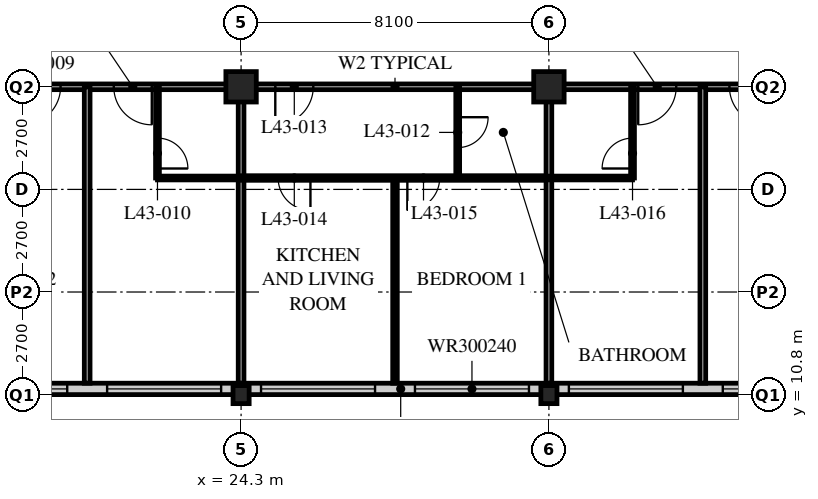
"""IFC4 building model, lengths in metres.
Left out: names, types, materials, properties, quantities, classifications, styles, units other than length and angle.
Written with IfcOpenShell. Run it as: python <this file> out.ifc"""

import sys

from ifc_helpers import new_model, si_unit, direction, frame, frame_2d, origin, origin_2d, place, context, subcontext, project, spatial, rectangle, hollow_rectangle, i_section, extrude, element, fill, save


model = new_model("IFC4")
c1 = context("Model", 3, precision=1e-05, world=origin(), true_north=direction((0.0, 1.0)))
c2 = subcontext(c1, "Body", "Model", "MODEL_VIEW")
j1 = project(units=[si_unit("LENGTHUNIT", "METRE"), si_unit("PLANEANGLEUNIT", "RADIAN")], contexts=[c1])
p1 = place(None, origin())
s1 = spatial("IfcSite", under=j1, at=p1, CompositionType="ELEMENT")
p2 = place(p1, origin())
s2 = spatial("IfcBuilding", under=s1, at=p2, CompositionType="ELEMENT")
p3 = place(p2, frame((0.0, 0.0, 170.4)))
s3 = spatial("IfcBuildingStorey", under=s2, at=p3, CompositionType="ELEMENT", Elevation=170.4)
p4 = place(p3, frame((24.3, 10.8, 0.0), z_axis=(0.0, 0.0, 1.0), x_axis=(1.0, 0.0, 0.0)))
e1 = element("IfcColumn", 1, at=p4, inside=s3, PredefinedType="COLUMN", context=c2, shape_type="SweptSolid", body=[
    extrude(i_section(OverallWidth=0.424, OverallDepth=0.475, WebThickness=0.048, FlangeThickness=0.077, FilletRadius=0.015, at=origin_2d()), origin(), (0.0, 0.0, 1.0), 3.6),
])
p5 = place(p3, frame((24.3, 18.9, 0.0), z_axis=(0.0, 0.0, 1.0), x_axis=(1.0, 0.0, 0.0)))
e2 = element("IfcColumn", 2, at=p5, inside=s3, PredefinedType="COLUMN", context=c2, shape_type="SweptSolid", body=[
    extrude(hollow_rectangle(XDim=0.8, YDim=0.8, WallThickness=0.08, at=origin_2d()), origin(), (0.0, 0.0, 1.0), 3.6),
])
p6 = place(p3, frame((32.4, 10.8, 0.0), z_axis=(0.0, 0.0, 1.0), x_axis=(1.0, 0.0, 0.0)))
e3 = element("IfcColumn", 3, at=p6, inside=s3, PredefinedType="COLUMN", context=c2, shape_type="SweptSolid", body=[
    extrude(i_section(OverallWidth=0.424, OverallDepth=0.475, WebThickness=0.048, FlangeThickness=0.077, FilletRadius=0.015, at=origin_2d()), origin(), (0.0, 0.0, 1.0), 3.6),
])
p7 = place(p3, frame((32.4, 18.9, 0.0), z_axis=(0.0, 0.0, 1.0), x_axis=(1.0, 0.0, 0.0)))
e4 = element("IfcColumn", 4, at=p7, inside=s3, PredefinedType="COLUMN", context=c2, shape_type="SweptSolid", body=[
    extrude(hollow_rectangle(XDim=0.8, YDim=0.8, WallThickness=0.08, at=origin_2d()), origin(), (0.0, 0.0, 1.0), 3.6),
])
p8 = place(p3, frame((8.4, 10.95, 0.0), z_axis=(0.0, 0.0, 1.0), x_axis=(1.0, 0.0, 0.0)))
e5 = element("IfcWall", 5, at=p8, inside=s3, PredefinedType="SOLIDWALL", context=c2, shape_type="SweptSolid", body=[
    extrude(rectangle(XDim=40.2, YDim=0.3, at=frame_2d((20.1, 0.0))), origin(), (0.0, 0.0, 1.0), 3.39),
])
p9 = place(p8, frame((0.225, 0.0, 0.6)))
e6 = element("IfcOpeningElement", 6, at=p9, cuts=e5, PredefinedType="OPENING", context=c2, shape_type="SweptSolid", body=[
    extrude(rectangle(XDim=3.0, YDim=2.4, at=frame_2d((1.5, 1.2))), frame((0.0, 0.16, 0.0), z_axis=(0.0, -1.0, 0.0), x_axis=(1.0, 0.0, 0.0)), (0.0, 0.0, 1.0), 0.32),
])
p10 = place(p8, frame((4.275, 0.0, 0.6)))
e7 = element("IfcOpeningElement", 7, at=p10, cuts=e5, PredefinedType="OPENING", context=c2, shape_type="SweptSolid", body=[
    extrude(rectangle(XDim=3.0, YDim=2.4, at=frame_2d((1.5, 1.2))), frame((0.0, 0.16, 0.0), z_axis=(0.0, -1.0, 0.0), x_axis=(1.0, 0.0, 0.0)), (0.0, 0.0, 1.0), 0.32),
])
p11 = place(p8, frame((8.325, 0.0, 0.6)))
e8 = element("IfcOpeningElement", 8, at=p11, cuts=e5, PredefinedType="OPENING", context=c2, shape_type="SweptSolid", body=[
    extrude(rectangle(XDim=3.0, YDim=2.4, at=frame_2d((1.5, 1.2))), frame((0.0, 0.16, 0.0), z_axis=(0.0, -1.0, 0.0), x_axis=(1.0, 0.0, 0.0)), (0.0, 0.0, 1.0), 0.32),
])
p12 = place(p8, frame((12.375, 0.0, 0.6)))
e9 = element("IfcOpeningElement", 9, at=p12, cuts=e5, PredefinedType="OPENING", context=c2, shape_type="SweptSolid", body=[
    extrude(rectangle(XDim=3.0, YDim=2.4, at=frame_2d((1.5, 1.2))), frame((0.0, 0.16, 0.0), z_axis=(0.0, -1.0, 0.0), x_axis=(1.0, 0.0, 0.0)), (0.0, 0.0, 1.0), 0.32),
])
p13 = place(p8, frame((16.425, 0.0, 0.6)))
e10 = element("IfcOpeningElement", 10, at=p13, cuts=e5, PredefinedType="OPENING", context=c2, shape_type="SweptSolid", body=[
    extrude(rectangle(XDim=3.0, YDim=2.4, at=frame_2d((1.5, 1.2))), frame((0.0, 0.16, 0.0), z_axis=(0.0, -1.0, 0.0), x_axis=(1.0, 0.0, 0.0)), (0.0, 0.0, 1.0), 0.32),
])
p14 = place(p8, frame((20.475, 0.0, 0.6)))
e11 = element("IfcOpeningElement", 11, at=p14, cuts=e5, PredefinedType="OPENING", context=c2, shape_type="SweptSolid", body=[
    extrude(rectangle(XDim=3.0, YDim=2.4, at=frame_2d((1.5, 1.2))), frame((0.0, 0.16, 0.0), z_axis=(0.0, -1.0, 0.0), x_axis=(1.0, 0.0, 0.0)), (0.0, 0.0, 1.0), 0.32),
])
p15 = place(p8, frame((24.525, 0.0, 0.6)))
e12 = element("IfcOpeningElement", 12, at=p15, cuts=e5, PredefinedType="OPENING", context=c2, shape_type="SweptSolid", body=[
    extrude(rectangle(XDim=3.0, YDim=2.4, at=frame_2d((1.5, 1.2))), frame((0.0, 0.16, 0.0), z_axis=(0.0, -1.0, 0.0), x_axis=(1.0, 0.0, 0.0)), (0.0, 0.0, 1.0), 0.32),
])
p16 = place(p8, frame((28.575, 0.0, 0.6)))
e13 = element("IfcOpeningElement", 13, at=p16, cuts=e5, PredefinedType="OPENING", context=c2, shape_type="SweptSolid", body=[
    extrude(rectangle(XDim=3.0, YDim=2.4, at=frame_2d((1.5, 1.2))), frame((0.0, 0.16, 0.0), z_axis=(0.0, -1.0, 0.0), x_axis=(1.0, 0.0, 0.0)), (0.0, 0.0, 1.0), 0.32),
])
p17 = place(p8, frame((32.625, 0.0, 0.6)))
e14 = element("IfcOpeningElement", 14, at=p17, cuts=e5, PredefinedType="OPENING", context=c2, shape_type="SweptSolid", body=[
    extrude(rectangle(XDim=3.0, YDim=2.4, at=frame_2d((1.5, 1.2))), frame((0.0, 0.16, 0.0), z_axis=(0.0, -1.0, 0.0), x_axis=(1.0, 0.0, 0.0)), (0.0, 0.0, 1.0), 0.32),
])
p18 = place(p8, frame((36.675, 0.0, 0.6)))
e15 = element("IfcOpeningElement", 15, at=p18, cuts=e5, PredefinedType="OPENING", context=c2, shape_type="SweptSolid", body=[
    extrude(rectangle(XDim=3.0, YDim=2.4, at=frame_2d((1.5, 1.2))), frame((0.0, 0.16, 0.0), z_axis=(0.0, -1.0, 0.0), x_axis=(1.0, 0.0, 0.0)), (0.0, 0.0, 1.0), 0.32),
])
p19 = place(p3, frame((12.15, 18.9, 0.0), z_axis=(0.0, 0.0, 1.0), x_axis=(1.0, 0.0, 0.0)))
e16 = element("IfcWall", 16, at=p19, inside=s3, PredefinedType="PARTITIONING", context=c2, shape_type="SweptSolid", body=[
    extrude(rectangle(XDim=32.4, YDim=0.15, at=frame_2d((16.2, 0.0))), origin(), (0.0, 0.0, 1.0), 2.778),
])
p20 = place(p19, frame((6.4, 0.0, 0.0)))
e17 = element("IfcOpeningElement", 17, at=p20, cuts=e16, PredefinedType="OPENING", context=c2, shape_type="SweptSolid", body=[
    extrude(rectangle(XDim=1.0, YDim=2.1, at=frame_2d((0.5, 1.05))), frame((0.0, 0.085, 0.0), z_axis=(0.0, -1.0, 0.0), x_axis=(1.0, 0.0, 0.0)), (0.0, 0.0, 1.0), 0.17),
])
p21 = place(p19, frame((8.8, 0.0, 0.0)))
e18 = element("IfcOpeningElement", 18, at=p21, cuts=e16, PredefinedType="OPENING", context=c2, shape_type="SweptSolid", body=[
    extrude(rectangle(XDim=1.0, YDim=2.1, at=frame_2d((0.5, 1.05))), frame((0.0, 0.085, 0.0), z_axis=(0.0, -1.0, 0.0), x_axis=(1.0, 0.0, 0.0)), (0.0, 0.0, 1.0), 0.17),
])
p22 = place(p19, frame((13.05, 0.0, 0.0)))
e19 = element("IfcOpeningElement", 19, at=p22, cuts=e16, PredefinedType="OPENING", context=c2, shape_type="SweptSolid", body=[
    extrude(rectangle(XDim=1.0, YDim=2.1, at=frame_2d((0.5, 1.05))), frame((0.0, 0.085, 0.0), z_axis=(0.0, -1.0, 0.0), x_axis=(1.0, 0.0, 0.0)), (0.0, 0.0, 1.0), 0.17),
])
p23 = place(p19, frame((22.6, 0.0, 0.0)))
e20 = element("IfcOpeningElement", 20, at=p23, cuts=e16, PredefinedType="OPENING", context=c2, shape_type="SweptSolid", body=[
    extrude(rectangle(XDim=1.0, YDim=2.1, at=frame_2d((0.5, 1.05))), frame((0.0, 0.085, 0.0), z_axis=(0.0, -1.0, 0.0), x_axis=(1.0, 0.0, 0.0)), (0.0, 0.0, 1.0), 0.17),
])
p24 = place(p19, frame((25.0, 0.0, 0.0)))
e21 = element("IfcOpeningElement", 21, at=p24, cuts=e16, PredefinedType="OPENING", context=c2, shape_type="SweptSolid", body=[
    extrude(rectangle(XDim=1.0, YDim=2.1, at=frame_2d((0.5, 1.05))), frame((0.0, 0.085, 0.0), z_axis=(0.0, -1.0, 0.0), x_axis=(1.0, 0.0, 0.0)), (0.0, 0.0, 1.0), 0.17),
])
p25 = place(p19, frame((1.525, 0.0, 0.0)))
e22 = element("IfcOpeningElement", 22, at=p25, cuts=e16, PredefinedType="OPENING", context=c2, shape_type="SweptSolid", body=[
    extrude(rectangle(XDim=1.0, YDim=2.1, at=frame_2d((0.5, 1.05))), frame((0.0, 0.085, 0.0), z_axis=(0.0, -1.0, 0.0), x_axis=(1.0, 0.0, 0.0)), (0.0, 0.0, 1.0), 0.17),
])
p26 = place(p19, frame((29.875, 0.0, 0.0)))
e23 = element("IfcOpeningElement", 23, at=p26, cuts=e16, PredefinedType="OPENING", context=c2, shape_type="SweptSolid", body=[
    extrude(rectangle(XDim=1.0, YDim=2.1, at=frame_2d((0.5, 1.05))), frame((0.0, 0.085, 0.0), z_axis=(0.0, -1.0, 0.0), x_axis=(1.0, 0.0, 0.0)), (0.0, 0.0, 1.0), 0.17),
])
p27 = place(p3, frame((20.25, 18.9, 0.0), z_axis=(0.0, 0.0, 1.0), x_axis=(0.0, -1.0, 0.0)))
e24 = element("IfcWall", 24, at=p27, inside=s3, PredefinedType="PARTITIONING", context=c2, shape_type="SweptSolid", body=[
    extrude(rectangle(XDim=7.8, YDim=0.15, at=frame_2d((3.9, 0.0))), origin(), (0.0, 0.0, 1.0), 3.39),
])
p28 = place(p3, frame((22.1, 16.5, 0.0), z_axis=(0.0, 0.0, 1.0), x_axis=(1.0, 0.0, 0.0)))
e25 = element("IfcWall", 25, at=p28, inside=s3, PredefinedType="PARTITIONING", context=c2, shape_type="SweptSolid", body=[
    extrude(rectangle(XDim=2.2, YDim=0.1, at=frame_2d((1.1, 0.0))), origin(), (0.0, 0.0, 1.0), 3.39),
])
p29 = place(p3, frame((22.1, 18.9, 0.0), z_axis=(0.0, 0.0, 1.0), x_axis=(0.0, -1.0, 0.0)))
e26 = element("IfcWall", 26, at=p29, inside=s3, PredefinedType="PARTITIONING", context=c2, shape_type="SweptSolid", body=[
    extrude(rectangle(XDim=2.4, YDim=0.1, at=frame_2d((1.2, 0.0))), origin(), (0.0, 0.0, 1.0), 3.39),
])
p30 = place(p29, frame((1.35, 0.0, 0.0)))
e27 = element("IfcOpeningElement", 27, at=p30, cuts=e26, PredefinedType="OPENING", context=c2, shape_type="SweptSolid", body=[
    extrude(rectangle(XDim=0.8, YDim=2.1, at=frame_2d((0.4, 1.05))), frame((0.0, 0.06, 0.0), z_axis=(0.0, -1.0, 0.0), x_axis=(1.0, 0.0, 0.0)), (0.0, 0.0, 1.0), 0.12),
])
p31 = place(p3, frame((24.3, 18.9, 0.0), z_axis=(0.0, 0.0, 1.0), x_axis=(0.0, -1.0, 0.0)))
e28 = element("IfcWall", 28, at=p31, inside=s3, PredefinedType="PARTITIONING", context=c2, shape_type="SweptSolid", body=[
    extrude(rectangle(XDim=7.8, YDim=0.15, at=frame_2d((3.9, 0.0))), origin(), (0.0, 0.0, 1.0), 2.778),
])
p32 = place(p3, frame((24.3, 16.5, 0.0), z_axis=(0.0, 0.0, 1.0), x_axis=(1.0, 0.0, 0.0)))
e29 = element("IfcWall", 29, at=p32, inside=s3, PredefinedType="PARTITIONING", context=c2, shape_type="SweptSolid", body=[
    extrude(rectangle(XDim=8.1, YDim=0.12, at=frame_2d((4.05, 0.0))), origin(), (0.0, 0.0, 1.0), 3.39),
])
p33 = place(p32, frame((0.975, 0.0, 0.0)))
e30 = element("IfcOpeningElement", 30, at=p33, cuts=e29, PredefinedType="OPENING", context=c2, shape_type="SweptSolid", body=[
    extrude(rectangle(XDim=0.85, YDim=2.1, at=frame_2d((0.425, 1.05))), frame((0.0, 0.07, 0.0), z_axis=(0.0, -1.0, 0.0), x_axis=(1.0, 0.0, 0.0)), (0.0, 0.0, 1.0), 0.14),
])
p34 = place(p32, frame((4.375, 0.0, 0.0)))
e31 = element("IfcOpeningElement", 31, at=p34, cuts=e29, PredefinedType="OPENING", context=c2, shape_type="SweptSolid", body=[
    extrude(rectangle(XDim=0.85, YDim=2.1, at=frame_2d((0.425, 1.05))), frame((0.0, 0.07, 0.0), z_axis=(0.0, -1.0, 0.0), x_axis=(1.0, 0.0, 0.0)), (0.0, 0.0, 1.0), 0.14),
])
p35 = place(p3, frame((30.0, 18.9, 0.0), z_axis=(0.0, 0.0, 1.0), x_axis=(0.0, -1.0, 0.0)))
e32 = element("IfcWall", 32, at=p35, inside=s3, PredefinedType="PARTITIONING", context=c2, shape_type="SweptSolid", body=[
    extrude(rectangle(XDim=2.4, YDim=0.1, at=frame_2d((1.2, 0.0))), origin(), (0.0, 0.0, 1.0), 3.39),
])
p36 = place(p35, frame((0.8, 0.0, 0.0)))
e33 = element("IfcOpeningElement", 33, at=p36, cuts=e32, PredefinedType="OPENING", context=c2, shape_type="SweptSolid", body=[
    extrude(rectangle(XDim=0.8, YDim=2.1, at=frame_2d((0.4, 1.05))), frame((0.0, 0.06, 0.0), z_axis=(0.0, -1.0, 0.0), x_axis=(1.0, 0.0, 0.0)), (0.0, 0.0, 1.0), 0.12),
])
p37 = place(p3, frame((28.35, 16.5, 0.0), z_axis=(0.0, 0.0, 1.0), x_axis=(0.0, -1.0, 0.0)))
e34 = element("IfcWall", 34, at=p37, inside=s3, PredefinedType="PARTITIONING", context=c2, shape_type="SweptSolid", body=[
    extrude(rectangle(XDim=5.4, YDim=0.12, at=frame_2d((2.7, 0.0))), origin(), (0.0, 0.0, 1.0), 3.39),
])
p38 = place(p3, frame((32.4, 18.9, 0.0), z_axis=(0.0, 0.0, 1.0), x_axis=(0.0, -1.0, 0.0)))
e35 = element("IfcWall", 35, at=p38, inside=s3, PredefinedType="PARTITIONING", context=c2, shape_type="SweptSolid", body=[
    extrude(rectangle(XDim=7.8, YDim=0.15, at=frame_2d((3.9, 0.0))), origin(), (0.0, 0.0, 1.0), 2.778),
])
p39 = place(p3, frame((32.4, 16.5, 0.0), z_axis=(0.0, 0.0, 1.0), x_axis=(1.0, 0.0, 0.0)))
e36 = element("IfcWall", 36, at=p39, inside=s3, PredefinedType="PARTITIONING", context=c2, shape_type="SweptSolid", body=[
    extrude(rectangle(XDim=2.2, YDim=0.1, at=frame_2d((1.1, 0.0))), origin(), (0.0, 0.0, 1.0), 3.39),
])
p40 = place(p3, frame((34.6, 18.9, 0.0), z_axis=(0.0, 0.0, 1.0), x_axis=(0.0, -1.0, 0.0)))
e37 = element("IfcWall", 37, at=p40, inside=s3, PredefinedType="PARTITIONING", context=c2, shape_type="SweptSolid", body=[
    extrude(rectangle(XDim=2.4, YDim=0.1, at=frame_2d((1.2, 0.0))), origin(), (0.0, 0.0, 1.0), 3.39),
])
p41 = place(p40, frame((1.35, 0.0, 0.0)))
e38 = element("IfcOpeningElement", 38, at=p41, cuts=e37, PredefinedType="OPENING", context=c2, shape_type="SweptSolid", body=[
    extrude(rectangle(XDim=0.8, YDim=2.1, at=frame_2d((0.4, 1.05))), frame((0.0, 0.06, 0.0), z_axis=(0.0, -1.0, 0.0), x_axis=(1.0, 0.0, 0.0)), (0.0, 0.0, 1.0), 0.12),
])
p42 = place(p3, frame((36.45, 18.9, 0.0), z_axis=(0.0, 0.0, 1.0), x_axis=(0.0, -1.0, 0.0)))
e39 = element("IfcWall", 39, at=p42, inside=s3, PredefinedType="PARTITIONING", context=c2, shape_type="SweptSolid", body=[
    extrude(rectangle(XDim=7.8, YDim=0.15, at=frame_2d((3.9, 0.0))), origin(), (0.0, 0.0, 1.0), 3.39),
])
p43 = place(p11, origin())
e40 = element("IfcWindow", 40, at=p43, inside=s3, PartitioningType="SINGLE_PANEL", PredefinedType="WINDOW", context=c2, shape_type="SweptSolid", body=[
    extrude(rectangle(XDim=3.0, YDim=2.4, at=frame_2d((1.5, 1.2))), frame((0.0, 0.03, 0.0), z_axis=(0.0, -1.0, 0.0), x_axis=(1.0, 0.0, 0.0)), (0.0, 0.0, 1.0), 0.06),
])
fill(e8, e40)
p44 = place(p12, origin())
e41 = element("IfcWindow", 41, at=p44, inside=s3, PartitioningType="SINGLE_PANEL", PredefinedType="WINDOW", context=c2, shape_type="SweptSolid", body=[
    extrude(rectangle(XDim=3.0, YDim=2.4, at=frame_2d((1.5, 1.2))), frame((0.0, 0.03, 0.0), z_axis=(0.0, -1.0, 0.0), x_axis=(1.0, 0.0, 0.0)), (0.0, 0.0, 1.0), 0.06),
])
fill(e9, e41)
p45 = place(p13, origin())
e42 = element("IfcWindow", 42, at=p45, inside=s3, PartitioningType="SINGLE_PANEL", PredefinedType="WINDOW", context=c2, shape_type="SweptSolid", body=[
    extrude(rectangle(XDim=3.0, YDim=2.4, at=frame_2d((1.5, 1.2))), frame((0.0, 0.03, 0.0), z_axis=(0.0, -1.0, 0.0), x_axis=(1.0, 0.0, 0.0)), (0.0, 0.0, 1.0), 0.06),
])
fill(e10, e42)
p46 = place(p14, origin())
e43 = element("IfcWindow", 43, at=p46, inside=s3, PartitioningType="SINGLE_PANEL", PredefinedType="WINDOW", context=c2, shape_type="SweptSolid", body=[
    extrude(rectangle(XDim=3.0, YDim=2.4, at=frame_2d((1.5, 1.2))), frame((0.0, 0.03, 0.0), z_axis=(0.0, -1.0, 0.0), x_axis=(1.0, 0.0, 0.0)), (0.0, 0.0, 1.0), 0.06),
])
fill(e11, e43)
p47 = place(p15, origin())
e44 = element("IfcWindow", 44, at=p47, inside=s3, PartitioningType="SINGLE_PANEL", PredefinedType="WINDOW", context=c2, shape_type="SweptSolid", body=[
    extrude(rectangle(XDim=3.0, YDim=2.4, at=frame_2d((1.5, 1.2))), frame((0.0, 0.03, 0.0), z_axis=(0.0, -1.0, 0.0), x_axis=(1.0, 0.0, 0.0)), (0.0, 0.0, 1.0), 0.06),
])
fill(e12, e44)
p48 = place(p16, origin())
e45 = element("IfcWindow", 45, at=p48, inside=s3, PartitioningType="SINGLE_PANEL", PredefinedType="WINDOW", context=c2, shape_type="SweptSolid", body=[
    extrude(rectangle(XDim=3.0, YDim=2.4, at=frame_2d((1.5, 1.2))), frame((0.0, 0.03, 0.0), z_axis=(0.0, -1.0, 0.0), x_axis=(1.0, 0.0, 0.0)), (0.0, 0.0, 1.0), 0.06),
])
fill(e13, e45)
p49 = place(p20, origin())
e46 = element("IfcDoor", 46, at=p49, inside=s3, OperationType="SINGLE_SWING_RIGHT", PredefinedType="DOOR", context=c2, shape_type="SweptSolid", body=[
    extrude(rectangle(XDim=1.0, YDim=2.1, at=frame_2d((0.5, 1.05))), frame((0.0, 0.025, 0.0), z_axis=(0.0, -1.0, 0.0), x_axis=(1.0, 0.0, 0.0)), (0.0, 0.0, 1.0), 0.05),
])
fill(e17, e46)
p50 = place(p30, origin())
e47 = element("IfcDoor", 47, at=p50, inside=s3, OperationType="SINGLE_SWING_RIGHT", PredefinedType="DOOR", context=c2, shape_type="SweptSolid", body=[
    extrude(rectangle(XDim=0.8, YDim=2.1, at=frame_2d((0.4, 1.05))), frame((0.0, 0.025, 0.0), z_axis=(0.0, -1.0, 0.0), x_axis=(1.0, 0.0, 0.0)), (0.0, 0.0, 1.0), 0.05),
])
fill(e27, e47)
p51 = place(p21, origin())
e48 = element("IfcDoor", 48, at=p51, inside=s3, OperationType="SINGLE_SWING_LEFT", PredefinedType="DOOR", context=c2, shape_type="SweptSolid", body=[
    extrude(rectangle(XDim=1.0, YDim=2.1, at=frame_2d((0.5, 1.05))), frame((0.0, 0.025, 0.0), z_axis=(0.0, -1.0, 0.0), x_axis=(1.0, 0.0, 0.0)), (0.0, 0.0, 1.0), 0.05),
])
fill(e18, e48)
p52 = place(p36, origin())
e49 = element("IfcDoor", 49, at=p52, inside=s3, OperationType="SINGLE_SWING_LEFT", PredefinedType="DOOR", context=c2, shape_type="SweptSolid", body=[
    extrude(rectangle(XDim=0.8, YDim=2.1, at=frame_2d((0.4, 1.05))), frame((0.0, 0.025, 0.0), z_axis=(0.0, -1.0, 0.0), x_axis=(1.0, 0.0, 0.0)), (0.0, 0.0, 1.0), 0.05),
])
fill(e33, e49)
p53 = place(p22, origin())
e50 = element("IfcDoor", 50, at=p53, inside=s3, OperationType="SINGLE_SWING_RIGHT", PredefinedType="DOOR", context=c2, shape_type="SweptSolid", body=[
    extrude(rectangle(XDim=1.0, YDim=2.1, at=frame_2d((0.5, 1.05))), frame((0.0, 0.025, 0.0), z_axis=(0.0, -1.0, 0.0), x_axis=(1.0, 0.0, 0.0)), (0.0, 0.0, 1.0), 0.05),
])
fill(e19, e50)
p54 = place(p33, origin())
e51 = element("IfcDoor", 51, at=p54, inside=s3, OperationType="SINGLE_SWING_LEFT", PredefinedType="DOOR", context=c2, shape_type="SweptSolid", body=[
    extrude(rectangle(XDim=0.85, YDim=2.1, at=frame_2d((0.425, 1.05))), frame((0.0, 0.025, 0.0), z_axis=(0.0, -1.0, 0.0), x_axis=(1.0, 0.0, 0.0)), (0.0, 0.0, 1.0), 0.05),
])
fill(e30, e51)
p55 = place(p34, origin())
e52 = element("IfcDoor", 52, at=p55, inside=s3, OperationType="SINGLE_SWING_RIGHT", PredefinedType="DOOR", context=c2, shape_type="SweptSolid", body=[
    extrude(rectangle(XDim=0.85, YDim=2.1, at=frame_2d((0.425, 1.05))), frame((0.0, 0.025, 0.0), z_axis=(0.0, -1.0, 0.0), x_axis=(1.0, 0.0, 0.0)), (0.0, 0.0, 1.0), 0.05),
])
fill(e31, e52)
p56 = place(p41, origin())
e53 = element("IfcDoor", 53, at=p56, inside=s3, OperationType="SINGLE_SWING_LEFT", PredefinedType="DOOR", context=c2, shape_type="SweptSolid", body=[
    extrude(rectangle(XDim=0.8, YDim=2.1, at=frame_2d((0.4, 1.05))), frame((0.0, 0.025, 0.0), z_axis=(0.0, -1.0, 0.0), x_axis=(1.0, 0.0, 0.0)), (0.0, 0.0, 1.0), 0.05),
])
fill(e38, e53)
p57 = place(p23, origin())
e54 = element("IfcDoor", 54, at=p57, inside=s3, OperationType="SINGLE_SWING_RIGHT", PredefinedType="DOOR", context=c2, shape_type="SweptSolid", body=[
    extrude(rectangle(XDim=1.0, YDim=2.1, at=frame_2d((0.5, 1.05))), frame((0.0, 0.025, 0.0), z_axis=(0.0, -1.0, 0.0), x_axis=(1.0, 0.0, 0.0)), (0.0, 0.0, 1.0), 0.05),
])
fill(e20, e54)
p58 = place(p24, origin())
e55 = element("IfcDoor", 55, at=p58, inside=s3, OperationType="SINGLE_SWING_LEFT", PredefinedType="DOOR", context=c2, shape_type="SweptSolid", body=[
    extrude(rectangle(XDim=1.0, YDim=2.1, at=frame_2d((0.5, 1.05))), frame((0.0, 0.025, 0.0), z_axis=(0.0, -1.0, 0.0), x_axis=(1.0, 0.0, 0.0)), (0.0, 0.0, 1.0), 0.05),
])
fill(e21, e55)
save(model, sys.argv[1])
